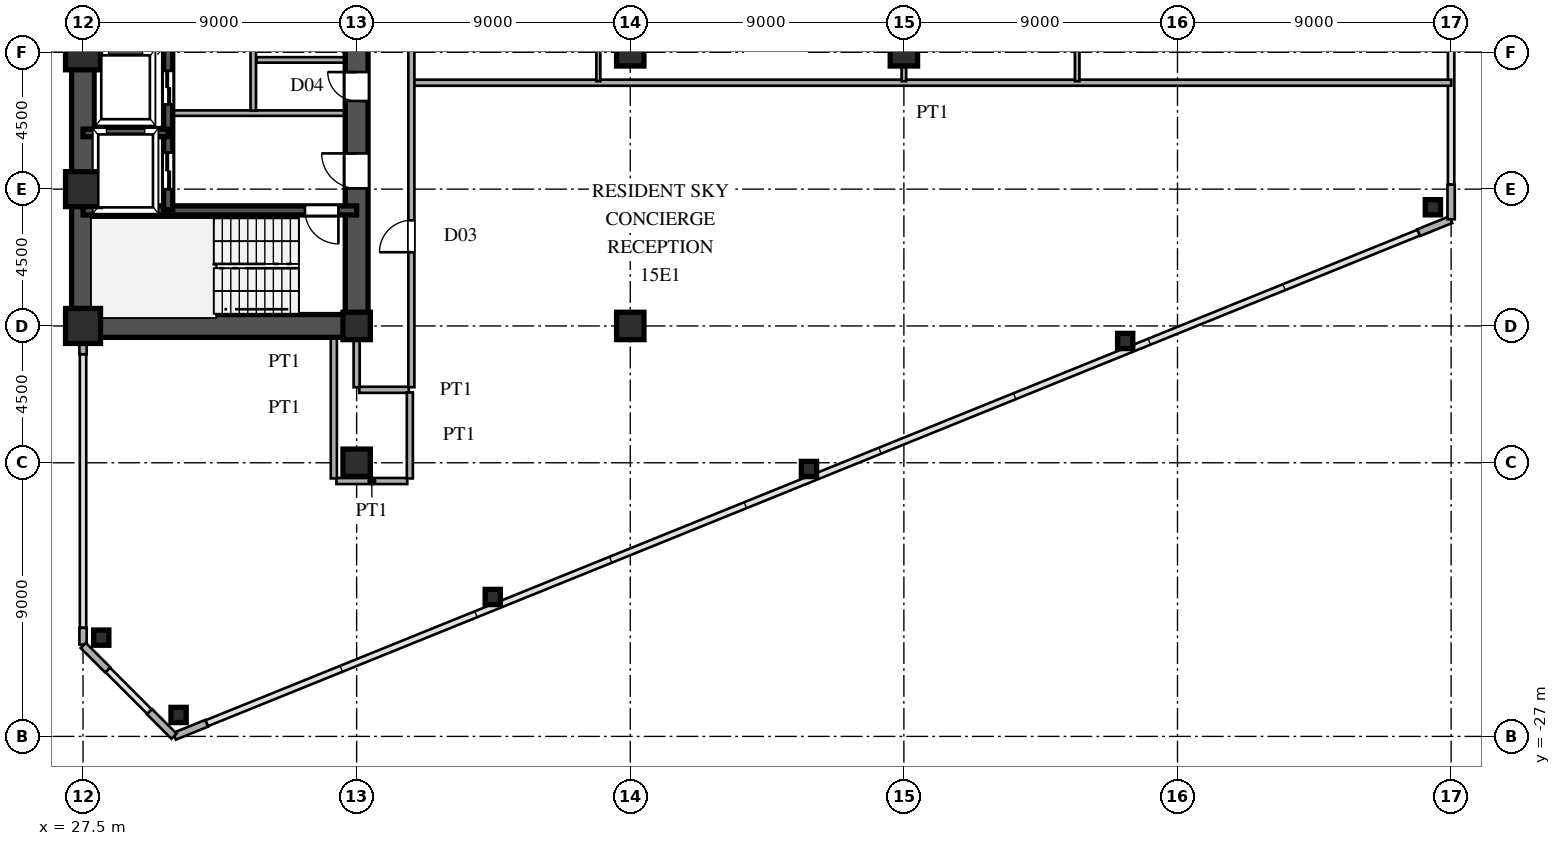
"""IFC4 building model, lengths in metres.
Left out: names, types, materials, properties, quantities, classifications, styles, units other than length and angle.
Written with IfcOpenShell. Run it as: python <this file> out.ifc"""

import sys

from ifc_helpers import new_model, si_unit, direction, frame, frame_2d, origin, origin_2d, place, context, subcontext, project, spatial, rectangle, hollow_rectangle, i_section, extrude, source, transform, mapped, element, fill, save


model = new_model("IFC4")
c1 = context("Model", 3, precision=1e-05, world=origin(), true_north=direction((0.0, 1.0)))
c2 = subcontext(c1, "Body", "Model", "MODEL_VIEW")
j1 = project(units=[si_unit("LENGTHUNIT", "METRE"), si_unit("PLANEANGLEUNIT", "RADIAN")], contexts=[c1])
p1 = place(None, origin())
s1 = spatial("IfcSite", under=j1, at=p1, CompositionType="ELEMENT")
p2 = place(p1, origin())
s2 = spatial("IfcBuilding", under=s1, at=p2, CompositionType="ELEMENT")
p3 = place(p2, frame((0.0, 0.0, 58.5)))
s3 = spatial("IfcBuildingStorey", under=s2, at=p3, CompositionType="ELEMENT", Elevation=58.5)
m1 = source(origin(), c2, "Body", "SweptSolid", [
    extrude(hollow_rectangle(XDim=1.15, YDim=1.15, WallThickness=0.048, at=origin_2d()), origin(), (0.0, 0.0, 1.0), 3.6),
])
for number, where, z_axis, x_axis in (
    (1, (27.5, -13.5, 0.0), (0.0, 0.0, 1.0), (1.0, 0.0, 0.0)),
    (2, (27.5, -9.0, 0.0), (0.0, 0.0, 1.0), (1.0, 0.0, 0.0)),
    (3, (27.5, -4.5, 0.0), (0.0, 0.0, 1.0), (1.0, 0.0, 0.0)),
):
    element("IfcColumn", number, at=place(p3, frame(where, z_axis=z_axis, x_axis=x_axis)), inside=s3, PredefinedType="COLUMN", context=c2, shape_type="MappedRepresentation", body=[
        mapped(m1, transform((0.0, 0.0, 0.0), scale=1.0)),
    ])
m2 = source(origin(), c2, "Body", "SweptSolid", [
    extrude(i_section(OverallWidth=0.9, OverallDepth=0.9, WebThickness=0.036, FlangeThickness=0.055, at=origin_2d()), origin(), (0.0, 0.0, 1.0), 3.6),
])
for number, where, z_axis, x_axis in (
    (4, (36.5, -18.0, 0.0), (0.0, 0.0, 1.0), (1.0, 0.0, 0.0)),
    (5, (36.5, -13.5, 0.0), (0.0, 0.0, 1.0), (1.0, 0.0, 0.0)),
    (6, (45.5, -13.5, 0.0), (0.0, 0.0, 1.0), (1.0, 0.0, 0.0)),
    (7, (45.5, -4.5, 0.0), (0.0, 0.0, 1.0), (1.0, 0.0, 0.0)),
    (8, (54.5, -4.5, 0.0), (0.0, 0.0, 1.0), (1.0, 0.0, 0.0)),
):
    element("IfcColumn", number, at=place(p3, frame(where, z_axis=z_axis, x_axis=x_axis)), inside=s3, PredefinedType="COLUMN", context=c2, shape_type="MappedRepresentation", body=[
        mapped(m2, transform((0.0, 0.0, 0.0), scale=1.0)),
    ])
m3 = source(origin(), c2, "Body", "SweptSolid", [
    extrude(hollow_rectangle(XDim=0.5, YDim=0.5, WallThickness=0.02, at=origin_2d()), origin(), (0.0, 0.0, 1.0), 3.6),
])
for number, where, z_axis, x_axis in (
    (9, (30.643, -26.295, 0.0), (0.0, 0.0, 1.0), (1.0, 0.0, 0.0)),
    (10, (71.9, -9.596, 0.0), (0.0, 0.0, 1.0), (1.0, 0.0, 0.0)),
    (11, (28.1, -23.751, 0.0), (0.0, 0.0, 1.0), (1.0, 0.0, 0.0)),
    (12, (40.977, -22.414, 0.0), (0.0, 0.0, 1.0), (1.0, 0.0, 0.0)),
    (13, (51.378, -18.204, 0.0), (0.0, 0.0, 1.0), (1.0, 0.0, 0.0)),
    (14, (61.779, -13.994, 0.0), (0.0, 0.0, 1.0), (1.0, 0.0, 0.0)),
):
    element("IfcColumn", number, at=place(p3, frame(where, z_axis=z_axis, x_axis=x_axis)), inside=s3, PredefinedType="COLUMN", context=c2, shape_type="MappedRepresentation", body=[
        mapped(m3, transform((0.0, 0.0, 0.0), scale=1.0)),
    ])
for number, where, z_axis, x_axis in (
    (15, (30.509, -26.996, 0.0), (0.0, 0.0, 1.0), (0.927, 0.375, 0.0)),
    (16, (71.434, -10.431, 0.0), (0.0, 0.0, 1.0), (0.927, 0.375, 0.0)),
    (17, (72.5, -9.99, 0.0), (0.0, 0.0, 1.0), (0.0, 1.0, 0.0)),
):
    element("IfcWall", number, at=place(p3, frame(where, z_axis=z_axis, x_axis=x_axis)), inside=s3, PredefinedType="SOLIDWALL", context=c2, shape_type="SweptSolid", body=[
        extrude(rectangle(XDim=1.14, YDim=0.24, at=frame_2d((0.57, 0.0))), origin(), (0.0, 0.0, 1.0), 3.38),
    ])
p4 = place(p3, frame((27.5, -23.98, 0.0), z_axis=(0.0, 0.0, 1.0), x_axis=(0.0, 1.0, 0.0)))
e18 = element("IfcWall", 18, at=p4, inside=s3, PredefinedType="SOLIDWALL", context=c2, shape_type="SweptSolid", body=[
    extrude(rectangle(XDim=0.55, YDim=0.24, at=frame_2d((0.275, 0.0))), origin(), (0.0, 0.0, 1.0), 3.38),
])
p5 = place(p3, frame((27.5, -14.43, 0.0), z_axis=(0.0, 0.0, 1.0), x_axis=(0.0, 1.0, 0.0)))
e19 = element("IfcWall", 19, at=p5, inside=s3, PredefinedType="SOLIDWALL", context=c2, shape_type="SweptSolid", body=[
    extrude(rectangle(XDim=0.55, YDim=0.24, at=frame_2d((0.275, 0.0))), origin(), (0.0, 0.0, 1.0), 1.88),
])
for number, where, z_axis, x_axis in (
    (20, (27.507, -24.007, 0.0), (0.0, 0.0, 1.0), (0.707, -0.707, 0.0)),
    (21, (29.687, -26.187, 0.0), (0.0, 0.0, 1.0), (0.707, -0.707, 0.0)),
):
    element("IfcWall", number, at=place(p3, frame(where, z_axis=z_axis, x_axis=x_axis)), inside=s3, PredefinedType="SOLIDWALL", context=c2, shape_type="SweptSolid", body=[
        extrude(rectangle(XDim=1.14, YDim=0.24, at=frame_2d((0.57, 0.0))), origin(), (0.0, 0.0, 1.0), 3.38),
    ])
p6 = place(p3, frame((27.5, -13.5, 0.0), z_axis=(0.0, 0.0, 1.0), x_axis=(0.0, 1.0, 0.0)))
e22 = element("IfcWall", 22, at=p6, inside=s3, PredefinedType="SHEAR", context=c2, shape_type="SweptSolid", body=[
    extrude(rectangle(XDim=12.2, YDim=0.75, at=frame_2d((6.1, 0.0))), origin(), (0.0, 0.0, 1.0), 3.38),
])
p7 = place(p3, frame((27.5, -13.5, 0.0), z_axis=(0.0, 0.0, 1.0), x_axis=(1.0, 0.0, 0.0)))
e23 = element("IfcWall", 23, at=p7, inside=s3, PredefinedType="SHEAR", context=c2, shape_type="SweptSolid", body=[
    extrude(rectangle(XDim=9.0, YDim=0.75, at=frame_2d((4.5, 0.0))), origin(), (0.0, 0.0, 1.0), 3.38),
])
p8 = place(p3, frame((36.5, -13.65, 0.0), z_axis=(0.0, 0.0, 1.0), x_axis=(0.0, 1.0, 0.0)))
e24 = element("IfcWall", 24, at=p8, inside=s3, PredefinedType="SHEAR", context=c2, shape_type="SweptSolid", body=[
    extrude(rectangle(XDim=7.15, YDim=0.75, at=frame_2d((3.575, 0.0))), origin(), (0.0, 0.0, 1.0), 3.38),
])
p9 = place(p8, frame((4.675, 0.0, 0.0)))
e25 = element("IfcOpeningElement", 25, at=p9, cuts=e24, PredefinedType="OPENING", context=c2, shape_type="SweptSolid", body=[
    extrude(rectangle(XDim=1.15, YDim=2.2, at=frame_2d((0.575, 1.1))), frame((0.0, 0.385, 0.0), z_axis=(0.0, -1.0, 0.0), x_axis=(1.0, 0.0, 0.0)), (0.0, 0.0, 1.0), 0.77),
])
p10 = place(p3, frame((36.5, -6.5, 0.0), z_axis=(0.0, 0.0, 1.0), x_axis=(0.0, 1.0, 0.0)))
e26 = element("IfcWall", 26, at=p10, inside=s3, PredefinedType="SHEAR", context=c2, shape_type="SweptSolid", body=[
    extrude(rectangle(XDim=1.75, YDim=0.75, at=frame_2d((0.875, 0.0))), origin(), (0.0, 0.0, 1.0), 3.38),
])
p11 = place(p10, frame((0.4, 0.0, 0.0)))
e27 = element("IfcOpeningElement", 27, at=p11, cuts=e26, PredefinedType="OPENING", context=c2, shape_type="SweptSolid", body=[
    extrude(rectangle(XDim=0.95, YDim=2.15, at=frame_2d((0.475, 1.075))), frame((0.0, 0.385, 0.0), z_axis=(0.0, -1.0, 0.0), x_axis=(1.0, 0.0, 0.0)), (0.0, 0.0, 1.0), 0.77),
])
p12 = place(p3, frame((36.5, -4.75, 0.0), z_axis=(0.0, 0.0, 1.0), x_axis=(0.0, 1.0, 0.0)))
e28 = element("IfcWall", 28, at=p12, inside=s3, PredefinedType="SHEAR", context=c2, shape_type="SweptSolid", body=[
    extrude(rectangle(XDim=1.75, YDim=0.75, at=frame_2d((0.875, 0.0))), origin(), (0.0, 0.0, 1.0), 3.38),
])
p13 = place(p12, frame((0.4, 0.0, 0.0)))
e29 = element("IfcOpeningElement", 29, at=p13, cuts=e28, PredefinedType="OPENING", context=c2, shape_type="SweptSolid", body=[
    extrude(rectangle(XDim=0.95, YDim=2.15, at=frame_2d((0.475, 1.075))), frame((0.0, 0.385, 0.0), z_axis=(0.0, -1.0, 0.0), x_axis=(1.0, 0.0, 0.0)), (0.0, 0.0, 1.0), 0.77),
])
p14 = place(p3, frame((27.5, -9.7, 0.0), z_axis=(0.0, 0.0, 1.0), x_axis=(1.0, 0.0, 0.0)))
e30 = element("IfcWall", 30, at=p14, inside=s3, PredefinedType="SHEAR", context=c2, shape_type="SweptSolid", body=[
    extrude(rectangle(XDim=9.0, YDim=0.3, at=frame_2d((4.5, 0.0))), origin(), (0.0, 0.0, 1.0), 3.38),
])
p15 = place(p14, frame((7.3, 0.0, 0.0)))
e31 = element("IfcOpeningElement", 31, at=p15, cuts=e30, PredefinedType="OPENING", context=c2, shape_type="SweptSolid", body=[
    extrude(rectangle(XDim=1.1, YDim=2.2, at=frame_2d((0.55, 1.1))), frame((0.0, 0.16, 0.0), z_axis=(0.0, -1.0, 0.0), x_axis=(1.0, 0.0, 0.0)), (0.0, 0.0, 1.0), 0.32),
])
p16 = place(p3, frame((27.5, -7.15, 0.0), z_axis=(0.0, 0.0, 1.0), x_axis=(1.0, 0.0, 0.0)))
e32 = element("IfcWall", 32, at=p16, inside=s3, PredefinedType="SHEAR", context=c2, shape_type="SweptSolid", body=[
    extrude(rectangle(XDim=2.8, YDim=0.25, at=frame_2d((1.4, 0.0))), origin(), (0.0, 0.0, 1.0), 3.38),
])
p17 = place(p3, frame((30.3, -9.68, 0.0), z_axis=(0.0, 0.0, 1.0), x_axis=(0.0, 1.0, 0.0)))
e33 = element("IfcWall", 33, at=p17, inside=s3, PredefinedType="SHEAR", context=c2, shape_type="SweptSolid", body=[
    extrude(rectangle(XDim=2.56, YDim=0.3, at=frame_2d((1.28, 0.0))), origin(), (0.0, 0.0, 1.0), 3.38),
])
p18 = place(p17, frame((0.68, 0.0, 0.0)))
e34 = element("IfcOpeningElement", 34, at=p18, cuts=e33, PredefinedType="OPENING", context=c2, shape_type="SweptSolid", body=[
    extrude(rectangle(XDim=1.2, YDim=2.25, at=frame_2d((0.6, 1.125))), frame((0.0, 0.16, 0.0), z_axis=(0.0, -1.0, 0.0), x_axis=(1.0, 0.0, 0.0)), (0.0, 0.0, 1.0), 0.32),
])
p19 = place(p3, frame((30.3, -7.12, 0.0), z_axis=(0.0, 0.0, 1.0), x_axis=(0.0, 1.0, 0.0)))
e35 = element("IfcWall", 35, at=p19, inside=s3, PredefinedType="SHEAR", context=c2, shape_type="SweptSolid", body=[
    extrude(rectangle(XDim=2.92, YDim=0.3, at=frame_2d((1.46, 0.0))), origin(), (0.0, 0.0, 1.0), 3.38),
])
p20 = place(p19, frame((0.91, 0.0, 0.0)))
e36 = element("IfcOpeningElement", 36, at=p20, cuts=e35, PredefinedType="OPENING", context=c2, shape_type="SweptSolid", body=[
    extrude(rectangle(XDim=1.1, YDim=2.2, at=frame_2d((0.55, 1.1))), frame((0.0, 0.16, 0.0), z_axis=(0.0, -1.0, 0.0), x_axis=(1.0, 0.0, 0.0)), (0.0, 0.0, 1.0), 0.32),
])
p21 = place(p3, frame((30.45, -6.5, 0.0), z_axis=(0.0, 0.0, 1.0), x_axis=(1.0, 0.0, 0.0)))
e37 = element("IfcWall", 37, at=p21, inside=s3, PredefinedType="PARTITIONING", context=c2, shape_type="SweptSolid", body=[
    extrude(rectangle(XDim=5.7, YDim=0.18, at=frame_2d((2.85, 0.0))), origin(), (0.0, 0.0, 1.0), 3.38),
])
p22 = place(p3, frame((33.1, -6.42, 0.0), z_axis=(0.0, 0.0, 1.0), x_axis=(0.0, 1.0, 0.0)))
e38 = element("IfcWall", 38, at=p22, inside=s3, PredefinedType="PARTITIONING", context=c2, shape_type="SweptSolid", body=[
    extrude(rectangle(XDim=5.04, YDim=0.18, at=frame_2d((2.52, 0.0))), origin(), (0.0, 0.0, 1.0), 3.38),
])
p23 = place(p3, frame((33.2, -4.75, 0.0), z_axis=(0.0, 0.0, 1.0), x_axis=(1.0, 0.0, 0.0)))
e39 = element("IfcWall", 39, at=p23, inside=s3, PredefinedType="PARTITIONING", context=c2, shape_type="SweptSolid", body=[
    extrude(rectangle(XDim=2.95, YDim=0.18, at=frame_2d((1.475, 0.0))), origin(), (0.0, 0.0, 1.0), 3.38),
])
p24 = place(p3, frame((35.835, -18.6, 0.0), z_axis=(0.0, 0.0, 1.0), x_axis=(1.0, 0.0, 0.0)))
e40 = element("IfcWall", 40, at=p24, inside=s3, PredefinedType="PARTITIONING", context=c2, shape_type="SweptSolid", body=[
    extrude(rectangle(XDim=2.33, YDim=0.2, at=frame_2d((1.165, 0.0))), origin(), (0.0, 0.0, 1.0), 3.38),
])
p25 = place(p3, frame((36.585, -15.6, 0.0), z_axis=(0.0, 0.0, 1.0), x_axis=(1.0, 0.0, 0.0)))
e41 = element("IfcWall", 41, at=p25, inside=s3, PredefinedType="PARTITIONING", context=c2, shape_type="SweptSolid", body=[
    extrude(rectangle(XDim=1.63, YDim=0.2, at=frame_2d((0.815, 0.0))), origin(), (0.0, 0.0, 1.0), 3.38),
])
p26 = place(p3, frame((38.38, -5.5, 0.0), z_axis=(0.0, 0.0, 1.0), x_axis=(1.0, 0.0, 0.0)))
e42 = element("IfcWall", 42, at=p26, inside=s3, PredefinedType="PARTITIONING", context=c2, shape_type="SweptSolid", body=[
    extrude(rectangle(XDim=34.125, YDim=0.2, at=frame_2d((17.062, 0.0))), origin(), (0.0, 0.0, 1.0), 3.38),
])
p27 = place(p3, frame((35.75, -18.515, 0.0), z_axis=(0.0, 0.0, 1.0), x_axis=(0.0, 1.0, 0.0)))
e43 = element("IfcWall", 43, at=p27, inside=s3, PredefinedType="PARTITIONING", context=c2, shape_type="SweptSolid", body=[
    extrude(rectangle(XDim=4.635, YDim=0.2, at=frame_2d((2.317, 0.0))), origin(), (0.0, 0.0, 1.0), 3.38),
])
p28 = place(p3, frame((36.5, -15.515, 0.0), z_axis=(0.0, 0.0, 1.0), x_axis=(0.0, 1.0, 0.0)))
e44 = element("IfcWall", 44, at=p28, inside=s3, PredefinedType="PARTITIONING", context=c2, shape_type="SweptSolid", body=[
    extrude(rectangle(XDim=1.635, YDim=0.2, at=frame_2d((0.817, 0.0))), origin(), (0.0, 0.0, 1.0), 1.38),
])
p29 = place(p3, frame((38.25, -18.515, 0.0), z_axis=(0.0, 0.0, 1.0), x_axis=(0.0, 1.0, 0.0)))
e45 = element("IfcWall", 45, at=p29, inside=s3, PredefinedType="PARTITIONING", context=c2, shape_type="SweptSolid", body=[
    extrude(rectangle(XDim=2.83, YDim=0.2, at=frame_2d((1.415, 0.0))), origin(), (0.0, 0.0, 1.0), 3.38),
])
p30 = place(p3, frame((38.3, -15.515, 0.0), z_axis=(0.0, 0.0, 1.0), x_axis=(0.0, 1.0, 0.0)))
e46 = element("IfcWall", 46, at=p30, inside=s3, PredefinedType="PARTITIONING", context=c2, shape_type="SweptSolid", body=[
    extrude(rectangle(XDim=31.03, YDim=0.2, at=frame_2d((15.515, 0.0))), origin(), (0.0, 0.0, 1.0), 3.38),
])
p31 = place(p30, frame((4.44, 0.0, 0.0)))
e47 = element("IfcOpeningElement", 47, at=p31, cuts=e46, PredefinedType="OPENING", context=c2, shape_type="SweptSolid", body=[
    extrude(rectangle(XDim=1.05, YDim=2.25, at=frame_2d((0.525, 1.125))), frame((0.0, 0.11, 0.0), z_axis=(0.0, -1.0, 0.0), x_axis=(1.0, 0.0, 0.0)), (0.0, 0.0, 1.0), 0.22),
])
p32 = place(p30, frame((16.28, 0.0, 0.0)))
e48 = element("IfcOpeningElement", 48, at=p32, cuts=e46, PredefinedType="OPENING", context=c2, shape_type="SweptSolid", body=[
    extrude(rectangle(XDim=1.05, YDim=2.25, at=frame_2d((0.525, 1.125))), frame((0.0, 0.11, 0.0), z_axis=(0.0, -1.0, 0.0), x_axis=(1.0, 0.0, 0.0)), (0.0, 0.0, 1.0), 0.22),
])
p33 = place(p30, frame((24.887, 0.0, 0.0)))
e49 = element("IfcOpeningElement", 49, at=p33, cuts=e46, PredefinedType="OPENING", context=c2, shape_type="SweptSolid", body=[
    extrude(rectangle(XDim=1.05, YDim=2.25, at=frame_2d((0.525, 1.125))), frame((0.0, 0.11, 0.0), z_axis=(0.0, -1.0, 0.0), x_axis=(1.0, 0.0, 0.0)), (0.0, 0.0, 1.0), 0.22),
])
p34 = place(p3, frame((44.45, -5.45, 0.0), z_axis=(0.0, 0.0, 1.0), x_axis=(0.0, 1.0, 0.0)))
e50 = element("IfcWall", 50, at=p34, inside=s3, PredefinedType="PARTITIONING", context=c2, shape_type="SweptSolid", body=[
    extrude(rectangle(XDim=9.233, YDim=0.13, at=frame_2d((4.616, 0.0))), origin(), (0.0, 0.0, 1.0), 3.38),
])
p35 = place(p34, frame((6.475, 0.0, 0.0)))
e51 = element("IfcOpeningElement", 51, at=p35, cuts=e50, PredefinedType="OPENING", context=c2, shape_type="SweptSolid", body=[
    extrude(rectangle(XDim=0.95, YDim=2.15, at=frame_2d((0.475, 1.075))), frame((0.0, 0.075, 0.0), z_axis=(0.0, -1.0, 0.0), x_axis=(1.0, 0.0, 0.0)), (0.0, 0.0, 1.0), 0.15),
])
p36 = place(p3, frame((54.5, -5.45, 0.0), z_axis=(0.0, 0.0, 1.0), x_axis=(0.0, 1.0, 0.0)))
e52 = element("IfcWall", 52, at=p36, inside=s3, PredefinedType="PARTITIONING", context=c2, shape_type="SweptSolid", body=[
    extrude(rectangle(XDim=22.469, YDim=0.15, at=frame_2d((11.234, 0.0))), origin(), (0.0, 0.0, 1.0), 2.68),
])
p37 = place(p36, frame((6.475, 0.0, 0.0)))
e53 = element("IfcOpeningElement", 53, at=p37, cuts=e52, PredefinedType="OPENING", context=c2, shape_type="SweptSolid", body=[
    extrude(rectangle(XDim=0.95, YDim=2.15, at=frame_2d((0.475, 1.075))), frame((0.0, 0.085, 0.0), z_axis=(0.0, -1.0, 0.0), x_axis=(1.0, 0.0, 0.0)), (0.0, 0.0, 1.0), 0.17),
])
p38 = place(p36, frame((15.617, 0.0, 0.0)))
e54 = element("IfcOpeningElement", 54, at=p38, cuts=e52, PredefinedType="OPENING", context=c2, shape_type="SweptSolid", body=[
    extrude(rectangle(XDim=0.95, YDim=2.15, at=frame_2d((0.475, 1.075))), frame((0.0, 0.085, 0.0), z_axis=(0.0, -1.0, 0.0), x_axis=(1.0, 0.0, 0.0)), (0.0, 0.0, 1.0), 0.17),
])
p39 = place(p3, frame((60.2, -5.45, 0.0), z_axis=(0.0, 0.0, 1.0), x_axis=(0.0, 1.0, 0.0)))
e55 = element("IfcWall", 55, at=p39, inside=s3, PredefinedType="PARTITIONING", context=c2, shape_type="SweptSolid", body=[
    extrude(rectangle(XDim=18.184, YDim=0.15, at=frame_2d((9.092, 0.0))), origin(), (0.0, 0.0, 1.0), 3.38),
])
p40 = place(p39, frame((1.808, 0.0, 0.0)))
e56 = element("IfcOpeningElement", 56, at=p40, cuts=e55, PredefinedType="OPENING", context=c2, shape_type="SweptSolid", body=[
    extrude(rectangle(XDim=0.95, YDim=2.15, at=frame_2d((0.475, 1.075))), frame((0.0, 0.085, 0.0), z_axis=(0.0, -1.0, 0.0), x_axis=(1.0, 0.0, 0.0)), (0.0, 0.0, 1.0), 0.17),
])
p41 = place(p39, frame((6.475, 0.0, 0.0)))
e57 = element("IfcOpeningElement", 57, at=p41, cuts=e55, PredefinedType="OPENING", context=c2, shape_type="SweptSolid", body=[
    extrude(rectangle(XDim=0.95, YDim=2.15, at=frame_2d((0.475, 1.075))), frame((0.0, 0.085, 0.0), z_axis=(0.0, -1.0, 0.0), x_axis=(1.0, 0.0, 0.0)), (0.0, 0.0, 1.0), 0.17),
])
p42 = place(p39, frame((11.142, 0.0, 0.0)))
e58 = element("IfcOpeningElement", 58, at=p42, cuts=e55, PredefinedType="OPENING", context=c2, shape_type="SweptSolid", body=[
    extrude(rectangle(XDim=0.95, YDim=2.15, at=frame_2d((0.475, 1.075))), frame((0.0, 0.085, 0.0), z_axis=(0.0, -1.0, 0.0), x_axis=(1.0, 0.0, 0.0)), (0.0, 0.0, 1.0), 0.17),
])
p43 = place(p39, frame((14.855, 0.0, 0.0)))
e59 = element("IfcOpeningElement", 59, at=p43, cuts=e55, PredefinedType="OPENING", context=c2, shape_type="SweptSolid", body=[
    extrude(rectangle(XDim=0.95, YDim=2.15, at=frame_2d((0.475, 1.075))), frame((0.0, 0.085, 0.0), z_axis=(0.0, -1.0, 0.0), x_axis=(1.0, 0.0, 0.0)), (0.0, 0.0, 1.0), 0.17),
])
m4 = source(origin(), c2, "Body", "SweptSolid", [
    extrude(rectangle(XDim=1.15, YDim=2.2, at=frame_2d((0.575, 1.1))), frame((0.0, 0.025, 0.0), z_axis=(0.0, -1.0, 0.0), x_axis=(1.0, 0.0, 0.0)), (0.0, 0.0, 1.0), 0.05),
])
p44 = place(p9, origin())
e60 = element("IfcDoor", 60, at=p44, inside=s3, OperationType="SINGLE_SWING_RIGHT", PredefinedType="DOOR", context=c2, shape_type="MappedRepresentation", body=[
    mapped(m4, transform((0.0, 0.0, 0.0), scale=1.0)),
])
fill(e25, e60)
m5 = source(origin(), c2, "Body", "SweptSolid", [
    extrude(rectangle(XDim=0.95, YDim=2.15, at=frame_2d((0.475, 1.075))), frame((0.0, 0.025, 0.0), z_axis=(0.0, -1.0, 0.0), x_axis=(1.0, 0.0, 0.0)), (0.0, 0.0, 1.0), 0.05),
])
p45 = place(p11, origin())
e61 = element("IfcDoor", 61, at=p45, inside=s3, OperationType="SINGLE_SWING_RIGHT", PredefinedType="DOOR", context=c2, shape_type="MappedRepresentation", body=[
    mapped(m5, transform((0.0, 0.0, 0.0), scale=1.0)),
])
fill(e27, e61)
m6 = source(origin(), c2, "Body", "SweptSolid", [
    extrude(rectangle(XDim=1.1, YDim=2.2, at=frame_2d((0.55, 1.1))), frame((0.0, 0.025, 0.0), z_axis=(0.0, -1.0, 0.0), x_axis=(1.0, 0.0, 0.0)), (0.0, 0.0, 1.0), 0.05),
])
p46 = place(p15, frame((1.1, 0.0, 0.0), z_axis=(0.0, 0.0, 1.0), x_axis=(-1.0, 0.0, 0.0)))
e62 = element("IfcDoor", 62, at=p46, inside=s3, OperationType="SINGLE_SWING_RIGHT", PredefinedType="DOOR", context=c2, shape_type="MappedRepresentation", body=[
    mapped(m6, transform((0.0, 0.0, 0.0), scale=1.0)),
])
fill(e31, e62)
m7 = source(origin(), c2, "Body", "SweptSolid", [
    extrude(rectangle(XDim=1.2, YDim=2.25, at=frame_2d((0.6, 1.125))), frame((0.0, 0.025, 0.0), z_axis=(0.0, -1.0, 0.0), x_axis=(1.0, 0.0, 0.0)), (0.0, 0.0, 1.0), 0.05),
])
p47 = place(p18, origin())
e63 = element("IfcDoor", 63, at=p47, inside=s3, OperationType="DOUBLE_DOOR_SLIDING", PredefinedType="DOOR", context=c2, shape_type="MappedRepresentation", body=[
    mapped(m7, transform((0.0, 0.0, 0.0), scale=1.0)),
])
fill(e34, e63)
m8 = source(origin(), c2, "Body", "SweptSolid", [
    extrude(rectangle(XDim=1.1, YDim=2.2, at=frame_2d((0.55, 1.1))), frame((0.0, 0.025, 0.0), z_axis=(0.0, -1.0, 0.0), x_axis=(1.0, 0.0, 0.0)), (0.0, 0.0, 1.0), 0.05),
])
p48 = place(p20, origin())
e64 = element("IfcDoor", 64, at=p48, inside=s3, OperationType="DOUBLE_DOOR_SLIDING", PredefinedType="DOOR", context=c2, shape_type="MappedRepresentation", body=[
    mapped(m8, transform((0.0, 0.0, 0.0), scale=1.0)),
])
fill(e36, e64)
m9 = source(origin(), c2, "Body", "SweptSolid", [
    extrude(rectangle(XDim=1.05, YDim=2.25, at=frame_2d((0.525, 1.125))), frame((0.0, 0.025, 0.0), z_axis=(0.0, -1.0, 0.0), x_axis=(1.0, 0.0, 0.0)), (0.0, 0.0, 1.0), 0.05),
])
p49 = place(p31, origin())
e65 = element("IfcDoor", 65, at=p49, inside=s3, OperationType="SINGLE_SWING_LEFT", PredefinedType="DOOR", context=c2, shape_type="MappedRepresentation", body=[
    mapped(m9, transform((0.0, 0.0, 0.0), scale=1.0)),
])
fill(e47, e65)
save(model, sys.argv[1])
